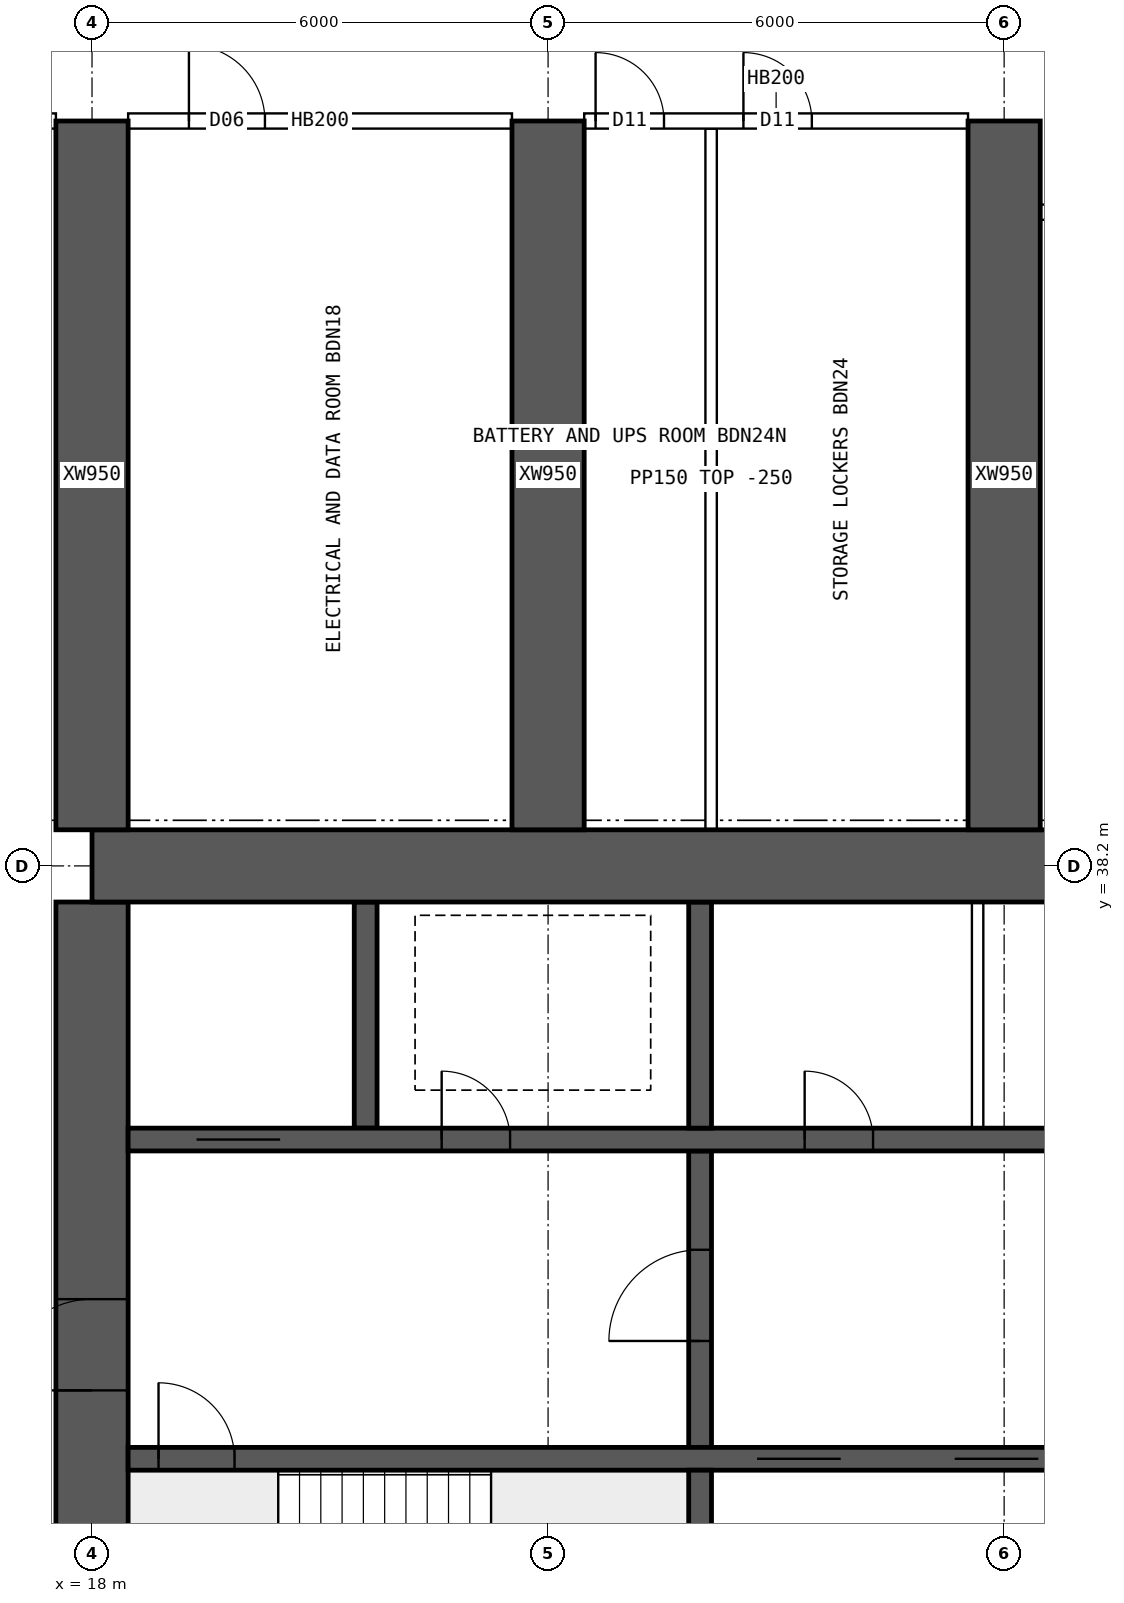
"""IFC4 building model, lengths in metres.
Left out: names, types, materials, properties, quantities, classifications, styles, units other than length and angle.
Written with IfcOpenShell. Run it as: python <this file> out.ifc"""

import sys

from ifc_helpers import new_model, si_unit, direction, frame, frame_2d, origin, place, context, subcontext, project, spatial, rectangle, extrude, element, fill, save


model = new_model("IFC4")
c1 = context("Model", 3, precision=1e-05, world=origin(), true_north=direction((0.0, 1.0)))
c2 = subcontext(c1, "Body", "Model", "MODEL_VIEW")
j1 = project(units=[si_unit("LENGTHUNIT", "METRE"), si_unit("PLANEANGLEUNIT", "RADIAN")], contexts=[c1])
p1 = place(None, origin())
s1 = spatial("IfcSite", under=j1, at=p1, CompositionType="ELEMENT")
p2 = place(p1, origin())
s2 = spatial("IfcBuilding", under=s1, at=p2, CompositionType="ELEMENT")
p3 = place(p2, frame((0.0, 0.0, 103.15)))
s3 = spatial("IfcBuildingStorey", under=s2, at=p3, CompositionType="ELEMENT", Elevation=103.15)
p4 = place(p3, frame((18.0, 38.2, 0.0), z_axis=(0.0, 0.0, 1.0), x_axis=(1.0, 0.0, 0.0)))
e1 = element("IfcWall", 1, at=p4, inside=s3, PredefinedType="SHEAR", context=c2, shape_type="SweptSolid", body=[
    extrude(rectangle(XDim=48.0, YDim=0.95, at=frame_2d((24.0, 0.0))), origin(), (0.0, 0.0, 1.0), 3.75),
])
p5 = place(p3, frame((18.0, 26.275, 0.0), z_axis=(0.0, 0.0, 1.0), x_axis=(0.0, 1.0, 0.0)))
e2 = element("IfcWall", 2, at=p5, inside=s3, PredefinedType="SHEAR", context=c2, shape_type="SweptSolid", body=[
    extrude(rectangle(XDim=11.45, YDim=0.95, at=frame_2d((5.725, 0.0))), origin(), (0.0, 0.0, 1.0), 3.75),
])
p6 = place(p5, frame((5.025, 0.0, 0.0)))
e3 = element("IfcOpeningElement", 3, at=p6, cuts=e2, PredefinedType="OPENING", context=c2, shape_type="SweptSolid", body=[
    extrude(rectangle(XDim=1.2, YDim=2.1, at=frame_2d((0.6, 1.05))), frame((0.0, 0.485, 0.0), z_axis=(0.0, -1.0, 0.0), x_axis=(1.0, 0.0, 0.0)), (0.0, 0.0, 1.0), 0.97),
])
p7 = place(p3, frame((18.475, 30.4, 0.0), z_axis=(0.0, 0.0, 1.0), x_axis=(1.0, 0.0, 0.0)))
e4 = element("IfcWall", 4, at=p7, inside=s3, PredefinedType="SHEAR", context=c2, shape_type="SweptSolid", body=[
    extrude(rectangle(XDim=47.05, YDim=0.3, at=frame_2d((23.525, 0.0))), origin(), (0.0, 0.0, 1.0), 3.75),
])
p8 = place(p7, frame((0.4, 0.0, 0.0)))
e5 = element("IfcOpeningElement", 5, at=p8, cuts=e4, PredefinedType="OPENING", context=c2, shape_type="SweptSolid", body=[
    extrude(rectangle(XDim=1.0, YDim=2.1, at=frame_2d((0.5, 1.05))), frame((0.0, 0.16, 0.0), z_axis=(0.0, -1.0, 0.0), x_axis=(1.0, 0.0, 0.0)), (0.0, 0.0, 1.0), 0.32),
])
p9 = place(p7, frame((45.65, 0.0, 0.0)))
e6 = element("IfcOpeningElement", 6, at=p9, cuts=e4, PredefinedType="OPENING", context=c2, shape_type="SweptSolid", body=[
    extrude(rectangle(XDim=1.0, YDim=2.1, at=frame_2d((0.5, 1.05))), frame((0.0, 0.16, 0.0), z_axis=(0.0, -1.0, 0.0), x_axis=(1.0, 0.0, 0.0)), (0.0, 0.0, 1.0), 0.32),
])
p10 = place(p7, frame((8.275, 0.0, 0.0)))
e7 = element("IfcOpeningElement", 7, at=p10, cuts=e4, PredefinedType="OPENING", context=c2, shape_type="SweptSolid", body=[
    extrude(rectangle(XDim=1.1, YDim=2.1, at=frame_2d((0.55, 1.05))), frame((0.0, 0.16, 0.0), z_axis=(0.0, -1.0, 0.0), x_axis=(1.0, 0.0, 0.0)), (0.0, 0.0, 1.0), 0.32),
])
p11 = place(p7, frame((10.875, 0.0, 0.0)))
e8 = element("IfcOpeningElement", 8, at=p11, cuts=e4, PredefinedType="OPENING", context=c2, shape_type="SweptSolid", body=[
    extrude(rectangle(XDim=1.1, YDim=2.1, at=frame_2d((0.55, 1.05))), frame((0.0, 0.16, 0.0), z_axis=(0.0, -1.0, 0.0), x_axis=(1.0, 0.0, 0.0)), (0.0, 0.0, 1.0), 0.32),
])
p12 = place(p7, frame((13.475, 0.0, 0.0)))
e9 = element("IfcOpeningElement", 9, at=p12, cuts=e4, PredefinedType="OPENING", context=c2, shape_type="SweptSolid", body=[
    extrude(rectangle(XDim=1.1, YDim=2.1, at=frame_2d((0.55, 1.05))), frame((0.0, 0.16, 0.0), z_axis=(0.0, -1.0, 0.0), x_axis=(1.0, 0.0, 0.0)), (0.0, 0.0, 1.0), 0.32),
])
p13 = place(p7, frame((16.075, 0.0, 0.0)))
e10 = element("IfcOpeningElement", 10, at=p13, cuts=e4, PredefinedType="OPENING", context=c2, shape_type="SweptSolid", body=[
    extrude(rectangle(XDim=1.1, YDim=2.1, at=frame_2d((0.55, 1.05))), frame((0.0, 0.16, 0.0), z_axis=(0.0, -1.0, 0.0), x_axis=(1.0, 0.0, 0.0)), (0.0, 0.0, 1.0), 0.32),
])
p14 = place(p7, frame((18.85, 0.0, 0.0)))
e11 = element("IfcOpeningElement", 11, at=p14, cuts=e4, PredefinedType="OPENING", context=c2, shape_type="SweptSolid", body=[
    extrude(rectangle(XDim=0.9, YDim=2.1, at=frame_2d((0.45, 1.05))), frame((0.0, 0.16, 0.0), z_axis=(0.0, -1.0, 0.0), x_axis=(1.0, 0.0, 0.0)), (0.0, 0.0, 1.0), 0.32),
])
p15 = place(p7, frame((30.142, 0.0, 0.0)))
e12 = element("IfcOpeningElement", 12, at=p15, cuts=e4, PredefinedType="OPENING", context=c2, shape_type="SweptSolid", body=[
    extrude(rectangle(XDim=1.1, YDim=2.1, at=frame_2d((0.55, 1.05))), frame((0.0, 0.16, 0.0), z_axis=(0.0, -1.0, 0.0), x_axis=(1.0, 0.0, 0.0)), (0.0, 0.0, 1.0), 0.32),
])
p16 = place(p7, frame((33.675, 0.0, 0.0)))
e13 = element("IfcOpeningElement", 13, at=p16, cuts=e4, PredefinedType="OPENING", context=c2, shape_type="SweptSolid", body=[
    extrude(rectangle(XDim=1.1, YDim=2.1, at=frame_2d((0.55, 1.05))), frame((0.0, 0.16, 0.0), z_axis=(0.0, -1.0, 0.0), x_axis=(1.0, 0.0, 0.0)), (0.0, 0.0, 1.0), 0.32),
])
p17 = place(p7, frame((37.208, 0.0, 0.0)))
e14 = element("IfcOpeningElement", 14, at=p17, cuts=e4, PredefinedType="OPENING", context=c2, shape_type="SweptSolid", body=[
    extrude(rectangle(XDim=1.1, YDim=2.1, at=frame_2d((0.55, 1.05))), frame((0.0, 0.16, 0.0), z_axis=(0.0, -1.0, 0.0), x_axis=(1.0, 0.0, 0.0)), (0.0, 0.0, 1.0), 0.32),
])
p18 = place(p3, frame((18.475, 34.6, 0.0), z_axis=(0.0, 0.0, 1.0), x_axis=(1.0, 0.0, 0.0)))
e15 = element("IfcWall", 15, at=p18, inside=s3, PredefinedType="SHEAR", context=c2, shape_type="SweptSolid", body=[
    extrude(rectangle(XDim=47.05, YDim=0.3, at=frame_2d((23.525, 0.0))), origin(), (0.0, 0.0, 1.0), 3.75),
])
p19 = place(p18, frame((0.9, 0.0, 0.0)))
e16 = element("IfcOpeningElement", 16, at=p19, cuts=e15, PredefinedType="OPENING", context=c2, shape_type="SweptSolid", body=[
    extrude(rectangle(XDim=1.1, YDim=2.1, at=frame_2d((0.55, 1.05))), frame((0.0, 0.16, 0.0), z_axis=(0.0, -1.0, 0.0), x_axis=(1.0, 0.0, 0.0)), (0.0, 0.0, 1.0), 0.32),
])
p20 = place(p18, frame((45.05, 0.0, 0.0)))
e17 = element("IfcOpeningElement", 17, at=p20, cuts=e15, PredefinedType="OPENING", context=c2, shape_type="SweptSolid", body=[
    extrude(rectangle(XDim=1.1, YDim=2.1, at=frame_2d((0.55, 1.05))), frame((0.0, 0.16, 0.0), z_axis=(0.0, -1.0, 0.0), x_axis=(1.0, 0.0, 0.0)), (0.0, 0.0, 1.0), 0.32),
])
p21 = place(p18, frame((4.125, 0.0, 0.0)))
e18 = element("IfcOpeningElement", 18, at=p21, cuts=e15, PredefinedType="OPENING", context=c2, shape_type="SweptSolid", body=[
    extrude(rectangle(XDim=0.9, YDim=2.1, at=frame_2d((0.45, 1.05))), frame((0.0, 0.16, 0.0), z_axis=(0.0, -1.0, 0.0), x_axis=(1.0, 0.0, 0.0)), (0.0, 0.0, 1.0), 0.32),
])
p22 = place(p18, frame((42.025, 0.0, 0.0)))
e19 = element("IfcOpeningElement", 19, at=p22, cuts=e15, PredefinedType="OPENING", context=c2, shape_type="SweptSolid", body=[
    extrude(rectangle(XDim=0.9, YDim=2.1, at=frame_2d((0.45, 1.05))), frame((0.0, 0.16, 0.0), z_axis=(0.0, -1.0, 0.0), x_axis=(1.0, 0.0, 0.0)), (0.0, 0.0, 1.0), 0.32),
])
p23 = place(p18, frame((8.9, 0.0, 0.0)))
e20 = element("IfcOpeningElement", 20, at=p23, cuts=e15, PredefinedType="OPENING", context=c2, shape_type="SweptSolid", body=[
    extrude(rectangle(XDim=0.9, YDim=2.1, at=frame_2d((0.45, 1.05))), frame((0.0, 0.16, 0.0), z_axis=(0.0, -1.0, 0.0), x_axis=(1.0, 0.0, 0.0)), (0.0, 0.0, 1.0), 0.32),
])
p24 = place(p18, frame((12.874, 0.0, 0.0)))
e21 = element("IfcOpeningElement", 21, at=p24, cuts=e15, PredefinedType="OPENING", context=c2, shape_type="SweptSolid", body=[
    extrude(rectangle(XDim=0.9, YDim=2.1, at=frame_2d((0.45, 1.05))), frame((0.0, 0.16, 0.0), z_axis=(0.0, -1.0, 0.0), x_axis=(1.0, 0.0, 0.0)), (0.0, 0.0, 1.0), 0.32),
])
p25 = place(p18, frame((16.521, 0.0, 0.0)))
e22 = element("IfcOpeningElement", 22, at=p25, cuts=e15, PredefinedType="OPENING", context=c2, shape_type="SweptSolid", body=[
    extrude(rectangle(XDim=0.9, YDim=2.1, at=frame_2d((0.45, 1.05))), frame((0.0, 0.16, 0.0), z_axis=(0.0, -1.0, 0.0), x_axis=(1.0, 0.0, 0.0)), (0.0, 0.0, 1.0), 0.32),
])
p26 = place(p18, frame((20.28, 0.0, 0.0)))
e23 = element("IfcOpeningElement", 23, at=p26, cuts=e15, PredefinedType="OPENING", context=c2, shape_type="SweptSolid", body=[
    extrude(rectangle(XDim=0.9, YDim=2.1, at=frame_2d((0.45, 1.05))), frame((0.0, 0.16, 0.0), z_axis=(0.0, -1.0, 0.0), x_axis=(1.0, 0.0, 0.0)), (0.0, 0.0, 1.0), 0.32),
])
p27 = place(p18, frame((24.686, 0.0, 0.0)))
e24 = element("IfcOpeningElement", 24, at=p27, cuts=e15, PredefinedType="OPENING", context=c2, shape_type="SweptSolid", body=[
    extrude(rectangle(XDim=0.9, YDim=2.1, at=frame_2d((0.45, 1.05))), frame((0.0, 0.16, 0.0), z_axis=(0.0, -1.0, 0.0), x_axis=(1.0, 0.0, 0.0)), (0.0, 0.0, 1.0), 0.32),
])
p28 = place(p18, frame((27.483, 0.0, 0.0)))
e25 = element("IfcOpeningElement", 25, at=p28, cuts=e15, PredefinedType="OPENING", context=c2, shape_type="SweptSolid", body=[
    extrude(rectangle(XDim=0.9, YDim=2.1, at=frame_2d((0.45, 1.05))), frame((0.0, 0.16, 0.0), z_axis=(0.0, -1.0, 0.0), x_axis=(1.0, 0.0, 0.0)), (0.0, 0.0, 1.0), 0.32),
])
p29 = place(p18, frame((29.653, 0.0, 0.0)))
e26 = element("IfcOpeningElement", 26, at=p29, cuts=e15, PredefinedType="OPENING", context=c2, shape_type="SweptSolid", body=[
    extrude(rectangle(XDim=0.9, YDim=2.1, at=frame_2d((0.45, 1.05))), frame((0.0, 0.16, 0.0), z_axis=(0.0, -1.0, 0.0), x_axis=(1.0, 0.0, 0.0)), (0.0, 0.0, 1.0), 0.32),
])
p30 = place(p18, frame((33.452, 0.0, 0.0)))
e27 = element("IfcOpeningElement", 27, at=p30, cuts=e15, PredefinedType="OPENING", context=c2, shape_type="SweptSolid", body=[
    extrude(rectangle(XDim=0.9, YDim=2.1, at=frame_2d((0.45, 1.05))), frame((0.0, 0.16, 0.0), z_axis=(0.0, -1.0, 0.0), x_axis=(1.0, 0.0, 0.0)), (0.0, 0.0, 1.0), 0.32),
])
p31 = place(p18, frame((37.403, 0.0, 0.0)))
e28 = element("IfcOpeningElement", 28, at=p31, cuts=e15, PredefinedType="OPENING", context=c2, shape_type="SweptSolid", body=[
    extrude(rectangle(XDim=0.9, YDim=2.1, at=frame_2d((0.45, 1.05))), frame((0.0, 0.16, 0.0), z_axis=(0.0, -1.0, 0.0), x_axis=(1.0, 0.0, 0.0)), (0.0, 0.0, 1.0), 0.32),
])
p32 = place(p3, frame((26.0, 26.275, 0.0), z_axis=(0.0, 0.0, 1.0), x_axis=(0.0, 1.0, 0.0)))
e29 = element("IfcWall", 29, at=p32, inside=s3, PredefinedType="SHEAR", context=c2, shape_type="SweptSolid", body=[
    extrude(rectangle(XDim=3.975, YDim=0.3, at=frame_2d((1.988, 0.0))), origin(), (0.0, 0.0, 1.0), 3.75),
])
p33 = place(p3, frame((26.0, 30.55, 0.0), z_axis=(0.0, 0.0, 1.0), x_axis=(0.0, 1.0, 0.0)))
e30 = element("IfcWall", 30, at=p33, inside=s3, PredefinedType="SHEAR", context=c2, shape_type="SweptSolid", body=[
    extrude(rectangle(XDim=3.9, YDim=0.3, at=frame_2d((1.95, 0.0))), origin(), (0.0, 0.0, 1.0), 3.75),
])
p34 = place(p33, frame((1.4, 0.0, 0.0)))
e31 = element("IfcOpeningElement", 31, at=p34, cuts=e30, PredefinedType="OPENING", context=c2, shape_type="SweptSolid", body=[
    extrude(rectangle(XDim=1.2, YDim=2.1, at=frame_2d((0.6, 1.05))), frame((0.0, 0.16, 0.0), z_axis=(0.0, -1.0, 0.0), x_axis=(1.0, 0.0, 0.0)), (0.0, 0.0, 1.0), 0.32),
])
for number, where, z_axis, x_axis in (
    (32, (21.6, 34.75, 0.0), (0.0, 0.0, 1.0), (0.0, 1.0, 0.0)),
    (33, (26.0, 34.75, 0.0), (0.0, 0.0, 1.0), (0.0, 1.0, 0.0)),
):
    element("IfcWall", number, at=place(p3, frame(where, z_axis=z_axis, x_axis=x_axis)), inside=s3, PredefinedType="SHEAR", context=c2, shape_type="SweptSolid", body=[
        extrude(rectangle(XDim=2.975, YDim=0.3, at=frame_2d((1.488, 0.0))), origin(), (0.0, 0.0, 1.0), 3.75),
    ])
for number, where, z_axis, x_axis in (
    (34, (18.0, 38.675, 0.0), (0.0, 0.0, 1.0), (0.0, 1.0, 0.0)),
    (35, (24.0, 38.675, 0.0), (0.0, 0.0, 1.0), (0.0, 1.0, 0.0)),
    (36, (30.0, 38.675, 0.0), (0.0, 0.0, 1.0), (0.0, 1.0, 0.0)),
):
    element("IfcWall", number, at=place(p3, frame(where, z_axis=z_axis, x_axis=x_axis)), inside=s3, PredefinedType="SHEAR", context=c2, shape_type="SweptSolid", body=[
        extrude(rectangle(XDim=9.325, YDim=0.95, at=frame_2d((4.663, 0.0))), origin(), (0.0, 0.0, 1.0), 3.75),
    ])
p35 = place(p3, frame((29.651, 34.75, 0.0), z_axis=(0.0, 0.0, 1.0), x_axis=(0.0, 1.0, 0.0)))
e37 = element("IfcWall", 37, at=p35, inside=s3, PredefinedType="SOLIDWALL", context=c2, shape_type="SweptSolid", body=[
    extrude(rectangle(XDim=2.975, YDim=0.15, at=frame_2d((1.488, 0.0))), origin(), (0.0, 0.0, 1.0), 3.5),
])
p36 = place(p3, frame((12.475, 48.0, 0.0), z_axis=(0.0, 0.0, 1.0), x_axis=(1.0, 0.0, 0.0)))
e38 = element("IfcWall", 38, at=p36, inside=s3, PredefinedType="SOLIDWALL", context=c2, shape_type="SweptSolid", body=[
    extrude(rectangle(XDim=5.05, YDim=0.2, at=frame_2d((2.525, 0.0))), origin(), (0.0, 0.0, 1.0), 3.5),
])
p37 = place(p36, frame((3.325, 0.0, 0.0)))
e39 = element("IfcOpeningElement", 39, at=p37, cuts=e38, PredefinedType="OPENING", context=c2, shape_type="SweptSolid", body=[
    extrude(rectangle(XDim=1.6, YDim=2.1, at=frame_2d((0.8, 1.05))), frame((0.0, 0.11, 0.0), z_axis=(0.0, -1.0, 0.0), x_axis=(1.0, 0.0, 0.0)), (0.0, 0.0, 1.0), 0.22),
])
p38 = place(p3, frame((18.475, 48.0, 0.0), z_axis=(0.0, 0.0, 1.0), x_axis=(1.0, 0.0, 0.0)))
e40 = element("IfcWall", 40, at=p38, inside=s3, PredefinedType="SOLIDWALL", context=c2, shape_type="SweptSolid", body=[
    extrude(rectangle(XDim=5.05, YDim=0.2, at=frame_2d((2.525, 0.0))), origin(), (0.0, 0.0, 1.0), 3.5),
])
p39 = place(p38, frame((0.8, 0.0, 0.0)))
e41 = element("IfcOpeningElement", 41, at=p39, cuts=e40, PredefinedType="OPENING", context=c2, shape_type="SweptSolid", body=[
    extrude(rectangle(XDim=1.0, YDim=2.1, at=frame_2d((0.5, 1.05))), frame((0.0, 0.11, 0.0), z_axis=(0.0, -1.0, 0.0), x_axis=(1.0, 0.0, 0.0)), (0.0, 0.0, 1.0), 0.22),
])
p40 = place(p3, frame((24.475, 48.0, 0.0), z_axis=(0.0, 0.0, 1.0), x_axis=(1.0, 0.0, 0.0)))
e42 = element("IfcWall", 42, at=p40, inside=s3, PredefinedType="SOLIDWALL", context=c2, shape_type="SweptSolid", body=[
    extrude(rectangle(XDim=5.05, YDim=0.2, at=frame_2d((2.525, 0.0))), origin(), (0.0, 0.0, 1.0), 3.5),
])
p41 = place(p40, frame((0.15, 0.0, 0.0)))
e43 = element("IfcOpeningElement", 43, at=p41, cuts=e42, PredefinedType="OPENING", context=c2, shape_type="SweptSolid", body=[
    extrude(rectangle(XDim=0.9, YDim=2.1, at=frame_2d((0.45, 1.05))), frame((0.0, 0.11, 0.0), z_axis=(0.0, -1.0, 0.0), x_axis=(1.0, 0.0, 0.0)), (0.0, 0.0, 1.0), 0.22),
])
p42 = place(p40, frame((2.095, 0.0, 0.0)))
e44 = element("IfcOpeningElement", 44, at=p42, cuts=e42, PredefinedType="OPENING", context=c2, shape_type="SweptSolid", body=[
    extrude(rectangle(XDim=0.9, YDim=2.1, at=frame_2d((0.45, 1.05))), frame((0.0, 0.11, 0.0), z_axis=(0.0, -1.0, 0.0), x_axis=(1.0, 0.0, 0.0)), (0.0, 0.0, 1.0), 0.22),
])
p43 = place(p3, frame((26.145, 38.675, 0.0), z_axis=(0.0, 0.0, 1.0), x_axis=(0.0, 1.0, 0.0)))
e45 = element("IfcWall", 45, at=p43, inside=s3, PredefinedType="PARTITIONING", context=c2, shape_type="SweptSolid", body=[
    extrude(rectangle(XDim=9.225, YDim=0.15, at=frame_2d((4.612, 0.0))), origin(), (0.0, 0.0, 1.0), 3.5),
])
p44 = place(p3, frame((30.475, 46.8, 0.0), z_axis=(0.0, 0.0, 1.0), x_axis=(1.0, 0.0, 0.0)))
e46 = element("IfcWall", 46, at=p44, inside=s3, PredefinedType="SOLIDWALL", context=c2, shape_type="SweptSolid", body=[
    extrude(rectangle(XDim=5.05, YDim=0.2, at=frame_2d((2.525, 0.0))), origin(), (0.0, 0.0, 1.0), 3.5),
])
p45 = place(p44, frame((0.8, 0.0, 0.0)))
e47 = element("IfcOpeningElement", 47, at=p45, cuts=e46, PredefinedType="OPENING", context=c2, shape_type="SweptSolid", body=[
    extrude(rectangle(XDim=1.0, YDim=2.1, at=frame_2d((0.5, 1.05))), frame((0.0, 0.11, 0.0), z_axis=(0.0, -1.0, 0.0), x_axis=(1.0, 0.0, 0.0)), (0.0, 0.0, 1.0), 0.22),
])
p46 = place(p6, origin())
e48 = element("IfcDoor", 48, at=p46, inside=s3, OperationType="SINGLE_SWING_LEFT", PredefinedType="DOOR", context=c2, shape_type="SweptSolid", body=[
    extrude(rectangle(XDim=1.2, YDim=2.1, at=frame_2d((0.6, 1.05))), frame((0.0, 0.025, 0.0), z_axis=(0.0, -1.0, 0.0), x_axis=(1.0, 0.0, 0.0)), (0.0, 0.0, 1.0), 0.05),
])
fill(e3, e48)
p47 = place(p8, origin())
e49 = element("IfcDoor", 49, at=p47, inside=s3, OperationType="SINGLE_SWING_LEFT", PredefinedType="DOOR", context=c2, shape_type="SweptSolid", body=[
    extrude(rectangle(XDim=1.0, YDim=2.1, at=frame_2d((0.5, 1.05))), frame((0.0, 0.025, 0.0), z_axis=(0.0, -1.0, 0.0), x_axis=(1.0, 0.0, 0.0)), (0.0, 0.0, 1.0), 0.05),
])
fill(e5, e49)
p48 = place(p19, origin())
e50 = element("IfcDoor", 50, at=p48, inside=s3, OperationType="DOUBLE_DOOR_SLIDING", PredefinedType="DOOR", context=c2, shape_type="SweptSolid", body=[
    extrude(rectangle(XDim=1.1, YDim=2.1, at=frame_2d((0.55, 1.05))), frame((0.0, 0.025, 0.0), z_axis=(0.0, -1.0, 0.0), x_axis=(1.0, 0.0, 0.0)), (0.0, 0.0, 1.0), 0.05),
])
fill(e16, e50)
p49 = place(p21, origin())
e51 = element("IfcDoor", 51, at=p49, inside=s3, OperationType="SINGLE_SWING_LEFT", PredefinedType="DOOR", context=c2, shape_type="SweptSolid", body=[
    extrude(rectangle(XDim=0.9, YDim=2.1, at=frame_2d((0.45, 1.05))), frame((0.0, 0.025, 0.0), z_axis=(0.0, -1.0, 0.0), x_axis=(1.0, 0.0, 0.0)), (0.0, 0.0, 1.0), 0.05),
])
fill(e18, e51)
p50 = place(p34, origin())
e52 = element("IfcDoor", 52, at=p50, inside=s3, OperationType="SINGLE_SWING_LEFT", PredefinedType="DOOR", context=c2, shape_type="SweptSolid", body=[
    extrude(rectangle(XDim=1.2, YDim=2.1, at=frame_2d((0.6, 1.05))), frame((0.0, 0.025, 0.0), z_axis=(0.0, -1.0, 0.0), x_axis=(1.0, 0.0, 0.0)), (0.0, 0.0, 1.0), 0.05),
])
fill(e31, e52)
p51 = place(p23, origin())
e53 = element("IfcDoor", 53, at=p51, inside=s3, OperationType="SINGLE_SWING_LEFT", PredefinedType="DOOR", context=c2, shape_type="SweptSolid", body=[
    extrude(rectangle(XDim=0.9, YDim=2.1, at=frame_2d((0.45, 1.05))), frame((0.0, 0.025, 0.0), z_axis=(0.0, -1.0, 0.0), x_axis=(1.0, 0.0, 0.0)), (0.0, 0.0, 1.0), 0.05),
])
fill(e20, e53)
p52 = place(p10, origin())
e54 = element("IfcDoor", 54, at=p52, inside=s3, OperationType="DOUBLE_DOOR_SLIDING", PredefinedType="DOOR", context=c2, shape_type="SweptSolid", body=[
    extrude(rectangle(XDim=1.1, YDim=2.1, at=frame_2d((0.55, 1.05))), frame((0.0, 0.025, 0.0), z_axis=(0.0, -1.0, 0.0), x_axis=(1.0, 0.0, 0.0)), (0.0, 0.0, 1.0), 0.05),
])
fill(e7, e54)
p53 = place(p11, origin())
e55 = element("IfcDoor", 55, at=p53, inside=s3, OperationType="DOUBLE_DOOR_SLIDING", PredefinedType="DOOR", context=c2, shape_type="SweptSolid", body=[
    extrude(rectangle(XDim=1.1, YDim=2.1, at=frame_2d((0.55, 1.05))), frame((0.0, 0.025, 0.0), z_axis=(0.0, -1.0, 0.0), x_axis=(1.0, 0.0, 0.0)), (0.0, 0.0, 1.0), 0.05),
])
fill(e8, e55)
p54 = place(p39, origin())
e56 = element("IfcDoor", 56, at=p54, inside=s3, OperationType="SINGLE_SWING_LEFT", PredefinedType="DOOR", context=c2, shape_type="SweptSolid", body=[
    extrude(rectangle(XDim=1.0, YDim=2.1, at=frame_2d((0.5, 1.05))), frame((0.0, 0.025, 0.0), z_axis=(0.0, -1.0, 0.0), x_axis=(1.0, 0.0, 0.0)), (0.0, 0.0, 1.0), 0.05),
])
fill(e41, e56)
p55 = place(p41, origin())
e57 = element("IfcDoor", 57, at=p55, inside=s3, OperationType="SINGLE_SWING_LEFT", PredefinedType="DOOR", context=c2, shape_type="SweptSolid", body=[
    extrude(rectangle(XDim=0.9, YDim=2.1, at=frame_2d((0.45, 1.05))), frame((0.0, 0.025, 0.0), z_axis=(0.0, -1.0, 0.0), x_axis=(1.0, 0.0, 0.0)), (0.0, 0.0, 1.0), 0.05),
])
fill(e43, e57)
p56 = place(p42, origin())
e58 = element("IfcDoor", 58, at=p56, inside=s3, OperationType="SINGLE_SWING_LEFT", PredefinedType="DOOR", context=c2, shape_type="SweptSolid", body=[
    extrude(rectangle(XDim=0.9, YDim=2.1, at=frame_2d((0.45, 1.05))), frame((0.0, 0.025, 0.0), z_axis=(0.0, -1.0, 0.0), x_axis=(1.0, 0.0, 0.0)), (0.0, 0.0, 1.0), 0.05),
])
fill(e44, e58)
save(model, sys.argv[1])
